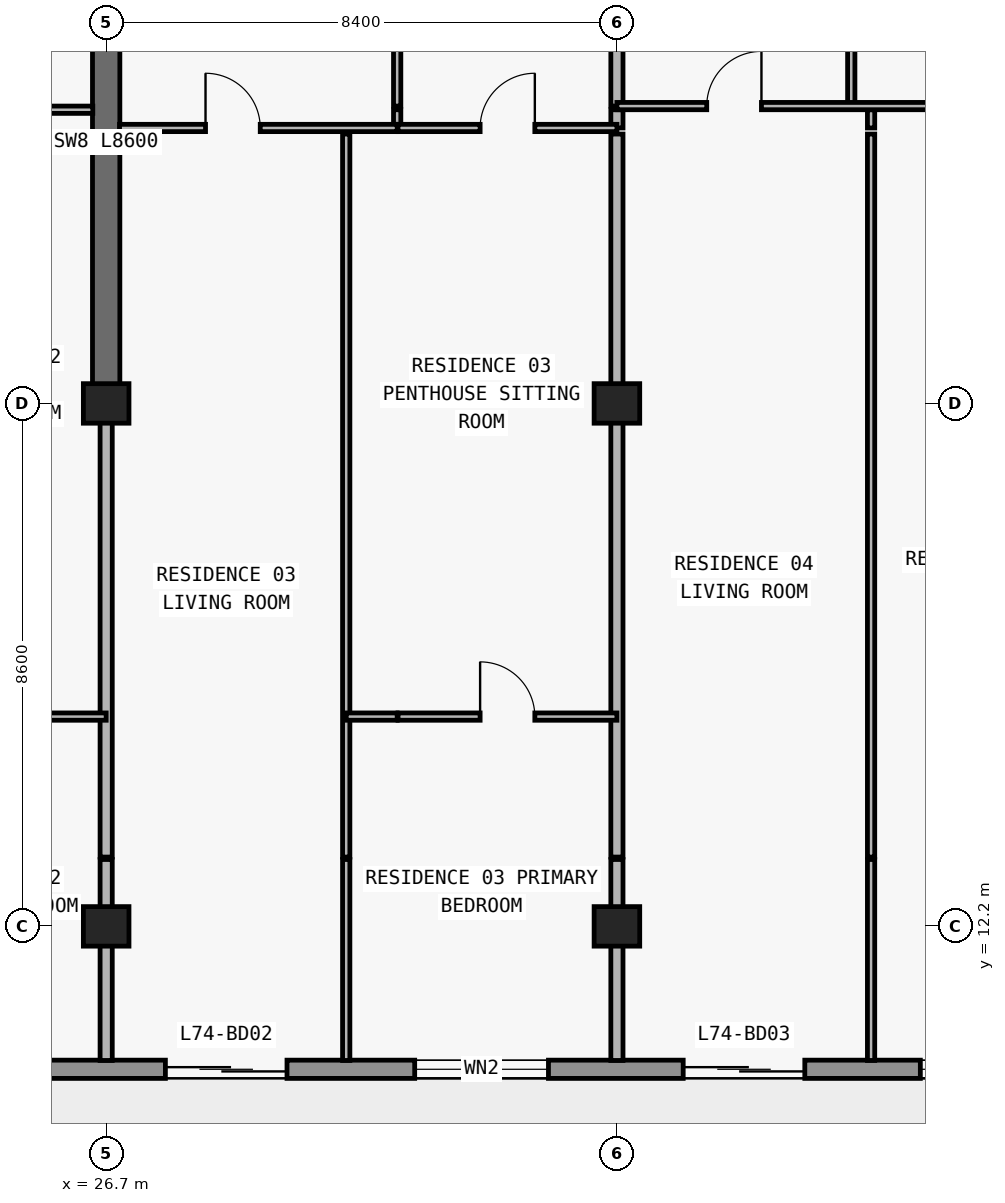
"""IFC4 building model, lengths in metres.
Left out: names, types, materials, properties, quantities, classifications, styles, units other than length and angle.
Written with IfcOpenShell. Run it as: python <this file> out.ifc"""

import sys

from ifc_helpers import new_model, si_unit, direction, frame, frame_2d, origin, origin_2d, place, context, subcontext, project, spatial, rectangle, extrude, element, fill, save


model = new_model("IFC4")
c1 = context("Model", 3, precision=1e-05, world=origin(), true_north=direction((0.0, 1.0)))
c2 = subcontext(c1, "Body", "Model", "MODEL_VIEW")
j1 = project(units=[si_unit("LENGTHUNIT", "METRE"), si_unit("PLANEANGLEUNIT", "RADIAN")], contexts=[c1])
p1 = place(None, origin())
s1 = spatial("IfcSite", under=j1, at=p1, CompositionType="ELEMENT")
p2 = place(p1, origin())
s2 = spatial("IfcBuilding", under=s1, at=p2, CompositionType="ELEMENT")
p3 = place(p2, frame((0.0, 0.0, 262.8)))
s3 = spatial("IfcBuildingStorey", under=s2, at=p3, CompositionType="ELEMENT", Elevation=262.8)
for number, where, z_axis, x_axis in (
    (1, (26.7, 12.2, 0.0), (0.0, 0.0, 1.0), (1.0, 0.0, 0.0)),
    (2, (35.1, 12.2, 0.0), (0.0, 0.0, 1.0), (1.0, 0.0, 0.0)),
    (3, (26.7, 20.8, 0.0), (0.0, 0.0, 1.0), (1.0, 0.0, 0.0)),
    (4, (35.1, 20.8, 0.0), (0.0, 0.0, 1.0), (1.0, 0.0, 0.0)),
):
    element("IfcColumn", number, at=place(p3, frame(where, z_axis=z_axis, x_axis=x_axis)), inside=s3, PredefinedType="COLUMN", context=c2, shape_type="SweptSolid", body=[
        extrude(rectangle(XDim=0.75, YDim=0.65, at=origin_2d()), origin(), (0.0, 0.0, 1.0), 3.05),
    ])
p4 = place(p3, frame((26.7, 20.8, 0.0), z_axis=(0.0, 0.0, 1.0), x_axis=(0.0, 1.0, 0.0)))
e5 = element("IfcWall", 5, at=p4, inside=s3, PredefinedType="SHEAR", context=c2, shape_type="SweptSolid", body=[
    extrude(rectangle(XDim=8.6, YDim=0.45, at=frame_2d((4.3, 0.0))), origin(), (0.0, 0.0, 1.0), 3.05),
])
p5 = place(p3, frame((65.7, 9.85, 0.0), z_axis=(0.0, 0.0, 1.0), x_axis=(-1.0, 0.0, 0.0)))
e6 = element("IfcWall", 6, at=p5, inside=s3, PredefinedType="STANDARD", context=c2, shape_type="SweptSolid", body=[
    extrude(rectangle(XDim=53.6, YDim=0.3, at=frame_2d((26.8, 0.0))), origin(), (0.0, 0.0, 1.0), 3.05),
])
p6 = place(p5, frame((48.05, 0.0, 0.85)))
e7 = element("IfcOpeningElement", 7, at=p6, cuts=e6, PredefinedType="OPENING", context=c2, shape_type="SweptSolid", body=[
    extrude(rectangle(XDim=1.8, YDim=1.55, at=frame_2d((0.9, 0.775))), frame((0.0, 0.16, 0.0), z_axis=(0.0, -1.0, 0.0), x_axis=(1.0, 0.0, 0.0)), (0.0, 0.0, 1.0), 0.32),
])
p7 = place(p5, frame((44.09, 0.0, 0.0)))
e8 = element("IfcOpeningElement", 8, at=p7, cuts=e6, PredefinedType="OPENING", context=c2, shape_type="SweptSolid", body=[
    extrude(rectangle(XDim=2.0, YDim=2.3, at=frame_2d((1.0, 1.15))), frame((0.0, 0.16, 0.0), z_axis=(0.0, -1.0, 0.0), x_axis=(1.0, 0.0, 0.0)), (0.0, 0.0, 1.0), 0.32),
])
p8 = place(p5, frame((39.99, 0.0, 0.85)))
e9 = element("IfcOpeningElement", 9, at=p8, cuts=e6, PredefinedType="OPENING", context=c2, shape_type="SweptSolid", body=[
    extrude(rectangle(XDim=1.8, YDim=1.55, at=frame_2d((0.9, 0.775))), frame((0.0, 0.16, 0.0), z_axis=(0.0, -1.0, 0.0), x_axis=(1.0, 0.0, 0.0)), (0.0, 0.0, 1.0), 0.32),
])
p9 = place(p5, frame((36.026, 0.0, 0.0)))
e10 = element("IfcOpeningElement", 10, at=p9, cuts=e6, PredefinedType="OPENING", context=c2, shape_type="SweptSolid", body=[
    extrude(rectangle(XDim=2.0, YDim=2.3, at=frame_2d((1.0, 1.15))), frame((0.0, 0.16, 0.0), z_axis=(0.0, -1.0, 0.0), x_axis=(1.0, 0.0, 0.0)), (0.0, 0.0, 1.0), 0.32),
])
p10 = place(p5, frame((31.726, 0.0, 0.85)))
e11 = element("IfcOpeningElement", 11, at=p10, cuts=e6, PredefinedType="OPENING", context=c2, shape_type="SweptSolid", body=[
    extrude(rectangle(XDim=2.2, YDim=1.55, at=frame_2d((1.1, 0.775))), frame((0.0, 0.16, 0.0), z_axis=(0.0, -1.0, 0.0), x_axis=(1.0, 0.0, 0.0)), (0.0, 0.0, 1.0), 0.32),
])
p11 = place(p5, frame((27.51, 0.0, 0.0)))
e12 = element("IfcOpeningElement", 12, at=p11, cuts=e6, PredefinedType="OPENING", context=c2, shape_type="SweptSolid", body=[
    extrude(rectangle(XDim=2.0, YDim=2.3, at=frame_2d((1.0, 1.15))), frame((0.0, 0.16, 0.0), z_axis=(0.0, -1.0, 0.0), x_axis=(1.0, 0.0, 0.0)), (0.0, 0.0, 1.0), 0.32),
])
p12 = place(p5, frame((23.81, 0.0, 0.85)))
e13 = element("IfcOpeningElement", 13, at=p12, cuts=e6, PredefinedType="OPENING", context=c2, shape_type="SweptSolid", body=[
    extrude(rectangle(XDim=1.8, YDim=1.55, at=frame_2d((0.9, 0.775))), frame((0.0, 0.16, 0.0), z_axis=(0.0, -1.0, 0.0), x_axis=(1.0, 0.0, 0.0)), (0.0, 0.0, 1.0), 0.32),
])
p13 = place(p5, frame((20.026, 0.0, 0.0)))
e14 = element("IfcOpeningElement", 14, at=p13, cuts=e6, PredefinedType="OPENING", context=c2, shape_type="SweptSolid", body=[
    extrude(rectangle(XDim=2.0, YDim=2.3, at=frame_2d((1.0, 1.15))), frame((0.0, 0.16, 0.0), z_axis=(0.0, -1.0, 0.0), x_axis=(1.0, 0.0, 0.0)), (0.0, 0.0, 1.0), 0.32),
])
p14 = place(p5, frame((15.726, 0.0, 0.85)))
e15 = element("IfcOpeningElement", 15, at=p14, cuts=e6, PredefinedType="OPENING", context=c2, shape_type="SweptSolid", body=[
    extrude(rectangle(XDim=2.2, YDim=1.55, at=frame_2d((1.1, 0.775))), frame((0.0, 0.16, 0.0), z_axis=(0.0, -1.0, 0.0), x_axis=(1.0, 0.0, 0.0)), (0.0, 0.0, 1.0), 0.32),
])
p15 = place(p5, frame((11.69, 0.0, 0.0)))
e16 = element("IfcOpeningElement", 16, at=p15, cuts=e6, PredefinedType="OPENING", context=c2, shape_type="SweptSolid", body=[
    extrude(rectangle(XDim=2.0, YDim=2.3, at=frame_2d((1.0, 1.15))), frame((0.0, 0.16, 0.0), z_axis=(0.0, -1.0, 0.0), x_axis=(1.0, 0.0, 0.0)), (0.0, 0.0, 1.0), 0.32),
])
p16 = place(p5, frame((7.01, 0.0, 0.65)))
e17 = element("IfcOpeningElement", 17, at=p16, cuts=e6, PredefinedType="OPENING", context=c2, shape_type="SweptSolid", body=[
    extrude(rectangle(XDim=2.6, YDim=1.85, at=frame_2d((1.3, 0.925))), frame((0.0, 0.16, 0.0), z_axis=(0.0, -1.0, 0.0), x_axis=(1.0, 0.0, 0.0)), (0.0, 0.0, 1.0), 0.32),
])
p17 = place(p5, frame((2.0, 0.0, 0.85)))
e18 = element("IfcOpeningElement", 18, at=p17, cuts=e6, PredefinedType="OPENING", context=c2, shape_type="SweptSolid", body=[
    extrude(rectangle(XDim=2.2, YDim=1.55, at=frame_2d((1.1, 0.775))), frame((0.0, 0.16, 0.0), z_axis=(0.0, -1.0, 0.0), x_axis=(1.0, 0.0, 0.0)), (0.0, 0.0, 1.0), 0.32),
])
p18 = place(p3, frame((26.7, 9.995, 0.0), z_axis=(0.0, 0.0, 1.0), x_axis=(0.0, 1.0, 0.0)))
e19 = element("IfcWall", 19, at=p18, inside=s3, PredefinedType="PARTITIONING", context=c2, shape_type="SweptSolid", body=[
    extrude(rectangle(XDim=3.305, YDim=0.2, at=frame_2d((1.652, 0.0))), origin(), (0.0, 0.0, 1.0), 2.263),
])
p19 = place(p3, frame((26.7, 13.34, 0.0), z_axis=(0.0, 0.0, 1.0), x_axis=(0.0, 1.0, 0.0)))
e20 = element("IfcWall", 20, at=p19, inside=s3, PredefinedType="PARTITIONING", context=c2, shape_type="SweptSolid", body=[
    extrude(rectangle(XDim=7.455, YDim=0.2, at=frame_2d((3.728, 0.0))), origin(), (0.0, 0.0, 1.0), 2.263),
])
p20 = place(p3, frame((30.648, 9.995, 0.0), z_axis=(0.0, 0.0, 1.0), x_axis=(0.0, 1.0, 0.0)))
e21 = element("IfcWall", 21, at=p20, inside=s3, PredefinedType="PARTITIONING", context=c2, shape_type="SweptSolid", body=[
    extrude(rectangle(XDim=3.305, YDim=0.12, at=frame_2d((1.652, 0.0))), origin(), (0.0, 0.0, 1.0), 3.05),
])
p21 = place(p3, frame((30.648, 13.34, 0.0), z_axis=(0.0, 0.0, 1.0), x_axis=(0.0, 1.0, 0.0)))
e22 = element("IfcWall", 22, at=p21, inside=s3, PredefinedType="PARTITIONING", context=c2, shape_type="SweptSolid", body=[
    extrude(rectangle(XDim=11.89, YDim=0.12, at=frame_2d((5.945, 0.0))), origin(), (0.0, 0.0, 1.0), 3.05),
])
p22 = place(p3, frame((31.486, 25.33, 0.0), z_axis=(0.0, 0.0, 1.0), x_axis=(0.0, 1.0, 0.0)))
e23 = element("IfcWall", 23, at=p22, inside=s3, PredefinedType="PARTITIONING", context=c2, shape_type="SweptSolid", body=[
    extrude(rectangle(XDim=0.3, YDim=0.12, at=frame_2d((0.15, 0.0))), origin(), (0.0, 0.0, 1.0), 3.05),
])
p23 = place(p3, frame((31.486, 25.69, 0.0), z_axis=(0.0, 0.0, 1.0), x_axis=(0.0, 1.0, 0.0)))
e24 = element("IfcWall", 24, at=p23, inside=s3, PredefinedType="PARTITIONING", context=c2, shape_type="SweptSolid", body=[
    extrude(rectangle(XDim=4.69, YDim=0.12, at=frame_2d((2.345, 0.0))), origin(), (0.0, 0.0, 1.0), 3.05),
])
p24 = place(p23, frame((1.895, 0.0, 0.0)))
e25 = element("IfcOpeningElement", 25, at=p24, cuts=e24, PredefinedType="OPENING", context=c2, shape_type="SweptSolid", body=[
    extrude(rectangle(XDim=0.9, YDim=2.15, at=frame_2d((0.45, 1.075))), frame((0.0, 0.07, 0.0), z_axis=(0.0, -1.0, 0.0), x_axis=(1.0, 0.0, 0.0)), (0.0, 0.0, 1.0), 0.14),
])
p25 = place(p3, frame((35.1, 9.995, 0.0), z_axis=(0.0, 0.0, 1.0), x_axis=(0.0, 1.0, 0.0)))
e26 = element("IfcWall", 26, at=p25, inside=s3, PredefinedType="PARTITIONING", context=c2, shape_type="SweptSolid", body=[
    extrude(rectangle(XDim=3.305, YDim=0.2, at=frame_2d((1.652, 0.0))), origin(), (0.0, 0.0, 1.0), 2.263),
])
p26 = place(p3, frame((35.1, 13.34, 0.0), z_axis=(0.0, 0.0, 1.0), x_axis=(0.0, 1.0, 0.0)))
e27 = element("IfcWall", 27, at=p26, inside=s3, PredefinedType="PARTITIONING", context=c2, shape_type="SweptSolid", body=[
    extrude(rectangle(XDim=11.89, YDim=0.2, at=frame_2d((5.945, 0.0))), origin(), (0.0, 0.0, 1.0), 2.263),
])
p27 = place(p3, frame((35.1, 25.33, 0.0), z_axis=(0.0, 0.0, 1.0), x_axis=(0.0, 1.0, 0.0)))
e28 = element("IfcWall", 28, at=p27, inside=s3, PredefinedType="PARTITIONING", context=c2, shape_type="SweptSolid", body=[
    extrude(rectangle(XDim=0.3, YDim=0.2, at=frame_2d((0.15, 0.0))), origin(), (0.0, 0.0, 1.0), 2.263),
])
p28 = place(p3, frame((35.1, 25.69, 0.0), z_axis=(0.0, 0.0, 1.0), x_axis=(0.0, 1.0, 0.0)))
e29 = element("IfcWall", 29, at=p28, inside=s3, PredefinedType="PARTITIONING", context=c2, shape_type="SweptSolid", body=[
    extrude(rectangle(XDim=4.69, YDim=0.2, at=frame_2d((2.345, 0.0))), origin(), (0.0, 0.0, 1.0), 2.263),
])
p29 = place(p3, frame((38.954, 25.69, 0.0), z_axis=(0.0, 0.0, 1.0), x_axis=(0.0, 1.0, 0.0)))
e30 = element("IfcWall", 30, at=p29, inside=s3, PredefinedType="PARTITIONING", context=c2, shape_type="SweptSolid", body=[
    extrude(rectangle(XDim=4.69, YDim=0.12, at=frame_2d((2.345, 0.0))), origin(), (0.0, 0.0, 1.0), 2.725),
])
p30 = place(p29, frame((1.895, 0.0, 0.0)))
e31 = element("IfcOpeningElement", 31, at=p30, cuts=e30, PredefinedType="OPENING", context=c2, shape_type="SweptSolid", body=[
    extrude(rectangle(XDim=0.9, YDim=2.15, at=frame_2d((0.45, 1.075))), frame((0.0, 0.07, 0.0), z_axis=(0.0, -1.0, 0.0), x_axis=(1.0, 0.0, 0.0)), (0.0, 0.0, 1.0), 0.14),
])
p31 = place(p3, frame((39.28, 9.995, 0.0), z_axis=(0.0, 0.0, 1.0), x_axis=(0.0, 1.0, 0.0)))
e32 = element("IfcWall", 32, at=p31, inside=s3, PredefinedType="PARTITIONING", context=c2, shape_type="SweptSolid", body=[
    extrude(rectangle(XDim=3.305, YDim=0.12, at=frame_2d((1.652, 0.0))), origin(), (0.0, 0.0, 1.0), 3.05),
])
p32 = place(p3, frame((39.28, 13.34, 0.0), z_axis=(0.0, 0.0, 1.0), x_axis=(0.0, 1.0, 0.0)))
e33 = element("IfcWall", 33, at=p32, inside=s3, PredefinedType="PARTITIONING", context=c2, shape_type="SweptSolid", body=[
    extrude(rectangle(XDim=11.89, YDim=0.12, at=frame_2d((5.945, 0.0))), origin(), (0.0, 0.0, 1.0), 3.05),
])
p33 = place(p3, frame((39.28, 25.33, 0.0), z_axis=(0.0, 0.0, 1.0), x_axis=(0.0, 1.0, 0.0)))
e34 = element("IfcWall", 34, at=p33, inside=s3, PredefinedType="PARTITIONING", context=c2, shape_type="SweptSolid", body=[
    extrude(rectangle(XDim=0.3, YDim=0.12, at=frame_2d((0.15, 0.0))), origin(), (0.0, 0.0, 1.0), 3.05),
])
p34 = place(p3, frame((22.92, 15.65, 0.0), z_axis=(0.0, 0.0, 1.0), x_axis=(1.0, 0.0, 0.0)))
e35 = element("IfcWall", 35, at=p34, inside=s3, PredefinedType="PARTITIONING", context=c2, shape_type="SweptSolid", body=[
    extrude(rectangle(XDim=3.78, YDim=0.12, at=frame_2d((1.89, 0.0))), origin(), (0.0, 0.0, 1.0), 3.05),
])
p35 = place(p34, frame((1.44, 0.0, 0.0)))
e36 = element("IfcOpeningElement", 36, at=p35, cuts=e35, PredefinedType="OPENING", context=c2, shape_type="SweptSolid", body=[
    extrude(rectangle(XDim=0.9, YDim=2.15, at=frame_2d((0.45, 1.075))), frame((0.0, 0.07, 0.0), z_axis=(0.0, -1.0, 0.0), x_axis=(1.0, 0.0, 0.0)), (0.0, 0.0, 1.0), 0.14),
])
p36 = place(p3, frame((30.648, 15.65, 0.0), z_axis=(0.0, 0.0, 1.0), x_axis=(1.0, 0.0, 0.0)))
e37 = element("IfcWall", 37, at=p36, inside=s3, PredefinedType="PARTITIONING", context=c2, shape_type="SweptSolid", body=[
    extrude(rectangle(XDim=0.838, YDim=0.12, at=frame_2d((0.419, 0.0))), origin(), (0.0, 0.0, 1.0), 3.05),
])
p37 = place(p3, frame((31.5, 15.65, 0.0), z_axis=(0.0, 0.0, 1.0), x_axis=(1.0, 0.0, 0.0)))
e38 = element("IfcWall", 38, at=p37, inside=s3, PredefinedType="PARTITIONING", context=c2, shape_type="SweptSolid", body=[
    extrude(rectangle(XDim=3.6, YDim=0.12, at=frame_2d((1.8, 0.0))), origin(), (0.0, 0.0, 1.0), 3.05),
])
p38 = place(p37, frame((1.35, 0.0, 0.0)))
e39 = element("IfcOpeningElement", 39, at=p38, cuts=e38, PredefinedType="OPENING", context=c2, shape_type="SweptSolid", body=[
    extrude(rectangle(XDim=0.9, YDim=2.15, at=frame_2d((0.45, 1.075))), frame((0.0, 0.07, 0.0), z_axis=(0.0, -1.0, 0.0), x_axis=(1.0, 0.0, 0.0)), (0.0, 0.0, 1.0), 0.14),
])
p39 = place(p3, frame((26.92, 25.33, 0.0), z_axis=(0.0, 0.0, 1.0), x_axis=(1.0, 0.0, 0.0)))
e40 = element("IfcWall", 40, at=p39, inside=s3, PredefinedType="PARTITIONING", context=c2, shape_type="SweptSolid", body=[
    extrude(rectangle(XDim=4.566, YDim=0.12, at=frame_2d((2.283, 0.0))), origin(), (0.0, 0.0, 1.0), 3.05),
])
p40 = place(p39, frame((1.414, 0.0, 0.0)))
e41 = element("IfcOpeningElement", 41, at=p40, cuts=e40, PredefinedType="OPENING", context=c2, shape_type="SweptSolid", body=[
    extrude(rectangle(XDim=0.9, YDim=2.15, at=frame_2d((0.45, 1.075))), frame((0.0, 0.07, 0.0), z_axis=(0.0, -1.0, 0.0), x_axis=(1.0, 0.0, 0.0)), (0.0, 0.0, 1.0), 0.14),
])
p41 = place(p3, frame((31.5, 25.33, 0.0), z_axis=(0.0, 0.0, 1.0), x_axis=(1.0, 0.0, 0.0)))
e42 = element("IfcWall", 42, at=p41, inside=s3, PredefinedType="PARTITIONING", context=c2, shape_type="SweptSolid", body=[
    extrude(rectangle(XDim=3.6, YDim=0.12, at=frame_2d((1.8, 0.0))), origin(), (0.0, 0.0, 1.0), 3.05),
])
p42 = place(p41, frame((1.35, 0.0, 0.0)))
e43 = element("IfcOpeningElement", 43, at=p42, cuts=e42, PredefinedType="OPENING", context=c2, shape_type="SweptSolid", body=[
    extrude(rectangle(XDim=0.9, YDim=2.15, at=frame_2d((0.45, 1.075))), frame((0.0, 0.07, 0.0), z_axis=(0.0, -1.0, 0.0), x_axis=(1.0, 0.0, 0.0)), (0.0, 0.0, 1.0), 0.14),
])
p43 = place(p3, frame((18.3, 25.63, 0.0), z_axis=(0.0, 0.0, 1.0), x_axis=(1.0, 0.0, 0.0)))
e44 = element("IfcWall", 44, at=p43, inside=s3, PredefinedType="PARTITIONING", context=c2, shape_type="SweptSolid", body=[
    extrude(rectangle(XDim=8.18, YDim=0.12, at=frame_2d((4.09, 0.0))), origin(), (0.0, 0.0, 1.0), 3.05),
])
p44 = place(p43, frame((1.818, 0.0, 0.0)))
e45 = element("IfcOpeningElement", 45, at=p44, cuts=e44, PredefinedType="OPENING", context=c2, shape_type="SweptSolid", body=[
    extrude(rectangle(XDim=0.9, YDim=2.15, at=frame_2d((0.45, 1.075))), frame((0.0, 0.07, 0.0), z_axis=(0.0, -1.0, 0.0), x_axis=(1.0, 0.0, 0.0)), (0.0, 0.0, 1.0), 0.14),
])
p45 = place(p43, frame((5.95, 0.0, 0.0)))
e46 = element("IfcOpeningElement", 46, at=p45, cuts=e44, PredefinedType="OPENING", context=c2, shape_type="SweptSolid", body=[
    extrude(rectangle(XDim=0.9, YDim=2.15, at=frame_2d((0.45, 1.075))), frame((0.0, 0.07, 0.0), z_axis=(0.0, -1.0, 0.0), x_axis=(1.0, 0.0, 0.0)), (0.0, 0.0, 1.0), 0.14),
])
p46 = place(p3, frame((35.1, 25.69, 0.0), z_axis=(0.0, 0.0, 1.0), x_axis=(1.0, 0.0, 0.0)))
e47 = element("IfcWall", 47, at=p46, inside=s3, PredefinedType="PARTITIONING", context=c2, shape_type="SweptSolid", body=[
    extrude(rectangle(XDim=7.6, YDim=0.12, at=frame_2d((3.8, 0.0))), origin(), (0.0, 0.0, 1.0), 3.05),
])
p47 = place(p46, frame((1.477, 0.0, 0.0)))
e48 = element("IfcOpeningElement", 48, at=p47, cuts=e47, PredefinedType="OPENING", context=c2, shape_type="SweptSolid", body=[
    extrude(rectangle(XDim=0.9, YDim=2.15, at=frame_2d((0.45, 1.075))), frame((0.0, 0.07, 0.0), z_axis=(0.0, -1.0, 0.0), x_axis=(1.0, 0.0, 0.0)), (0.0, 0.0, 1.0), 0.14),
])
p48 = place(p46, frame((5.44, 0.0, 0.0)))
e49 = element("IfcOpeningElement", 49, at=p48, cuts=e47, PredefinedType="OPENING", context=c2, shape_type="SweptSolid", body=[
    extrude(rectangle(XDim=0.9, YDim=2.15, at=frame_2d((0.45, 1.075))), frame((0.0, 0.07, 0.0), z_axis=(0.0, -1.0, 0.0), x_axis=(1.0, 0.0, 0.0)), (0.0, 0.0, 1.0), 0.14),
])
p49 = place(p9, origin())
e50 = element("IfcDoor", 50, at=p49, inside=s3, OperationType="DOUBLE_DOOR_SLIDING", PredefinedType="DOOR", context=c2, shape_type="SweptSolid", body=[
    extrude(rectangle(XDim=2.0, YDim=2.3, at=frame_2d((1.0, 1.15))), frame((0.0, 0.025, 0.0), z_axis=(0.0, -1.0, 0.0), x_axis=(1.0, 0.0, 0.0)), (0.0, 0.0, 1.0), 0.05),
])
fill(e10, e50)
p50 = place(p10, origin())
e51 = element("IfcWindow", 51, at=p50, inside=s3, PartitioningType="SINGLE_PANEL", PredefinedType="WINDOW", context=c2, shape_type="SweptSolid", body=[
    extrude(rectangle(XDim=2.2, YDim=1.55, at=frame_2d((1.1, 0.775))), frame((0.0, 0.03, 0.0), z_axis=(0.0, -1.0, 0.0), x_axis=(1.0, 0.0, 0.0)), (0.0, 0.0, 1.0), 0.06),
])
fill(e11, e51)
p51 = place(p11, origin())
e52 = element("IfcDoor", 52, at=p51, inside=s3, OperationType="DOUBLE_DOOR_SLIDING", PredefinedType="DOOR", context=c2, shape_type="SweptSolid", body=[
    extrude(rectangle(XDim=2.0, YDim=2.3, at=frame_2d((1.0, 1.15))), frame((0.0, 0.025, 0.0), z_axis=(0.0, -1.0, 0.0), x_axis=(1.0, 0.0, 0.0)), (0.0, 0.0, 1.0), 0.05),
])
fill(e12, e52)
p52 = place(p12, origin())
e53 = element("IfcWindow", 53, at=p52, inside=s3, PartitioningType="SINGLE_PANEL", PredefinedType="WINDOW", context=c2, shape_type="SweptSolid", body=[
    extrude(rectangle(XDim=1.8, YDim=1.55, at=frame_2d((0.9, 0.775))), frame((0.0, 0.03, 0.0), z_axis=(0.0, -1.0, 0.0), x_axis=(1.0, 0.0, 0.0)), (0.0, 0.0, 1.0), 0.06),
])
fill(e13, e53)
p53 = place(p40, origin())
e54 = element("IfcDoor", 54, at=p53, inside=s3, OperationType="SINGLE_SWING_LEFT", PredefinedType="DOOR", context=c2, shape_type="SweptSolid", body=[
    extrude(rectangle(XDim=0.9, YDim=2.15, at=frame_2d((0.45, 1.075))), frame((0.0, 0.025, 0.0), z_axis=(0.0, -1.0, 0.0), x_axis=(1.0, 0.0, 0.0)), (0.0, 0.0, 1.0), 0.05),
])
fill(e41, e54)
p54 = place(p42, origin())
e55 = element("IfcDoor", 55, at=p54, inside=s3, OperationType="SINGLE_SWING_RIGHT", PredefinedType="DOOR", context=c2, shape_type="SweptSolid", body=[
    extrude(rectangle(XDim=0.9, YDim=2.15, at=frame_2d((0.45, 1.075))), frame((0.0, 0.025, 0.0), z_axis=(0.0, -1.0, 0.0), x_axis=(1.0, 0.0, 0.0)), (0.0, 0.0, 1.0), 0.05),
])
fill(e43, e55)
p55 = place(p38, origin())
e56 = element("IfcDoor", 56, at=p55, inside=s3, OperationType="SINGLE_SWING_LEFT", PredefinedType="DOOR", context=c2, shape_type="SweptSolid", body=[
    extrude(rectangle(XDim=0.9, YDim=2.15, at=frame_2d((0.45, 1.075))), frame((0.0, 0.025, 0.0), z_axis=(0.0, -1.0, 0.0), x_axis=(1.0, 0.0, 0.0)), (0.0, 0.0, 1.0), 0.05),
])
fill(e39, e56)
p56 = place(p47, origin())
e57 = element("IfcDoor", 57, at=p56, inside=s3, OperationType="SINGLE_SWING_RIGHT", PredefinedType="DOOR", context=c2, shape_type="SweptSolid", body=[
    extrude(rectangle(XDim=0.9, YDim=2.15, at=frame_2d((0.45, 1.075))), frame((0.0, 0.025, 0.0), z_axis=(0.0, -1.0, 0.0), x_axis=(1.0, 0.0, 0.0)), (0.0, 0.0, 1.0), 0.05),
])
fill(e48, e57)
save(model, sys.argv[1])
